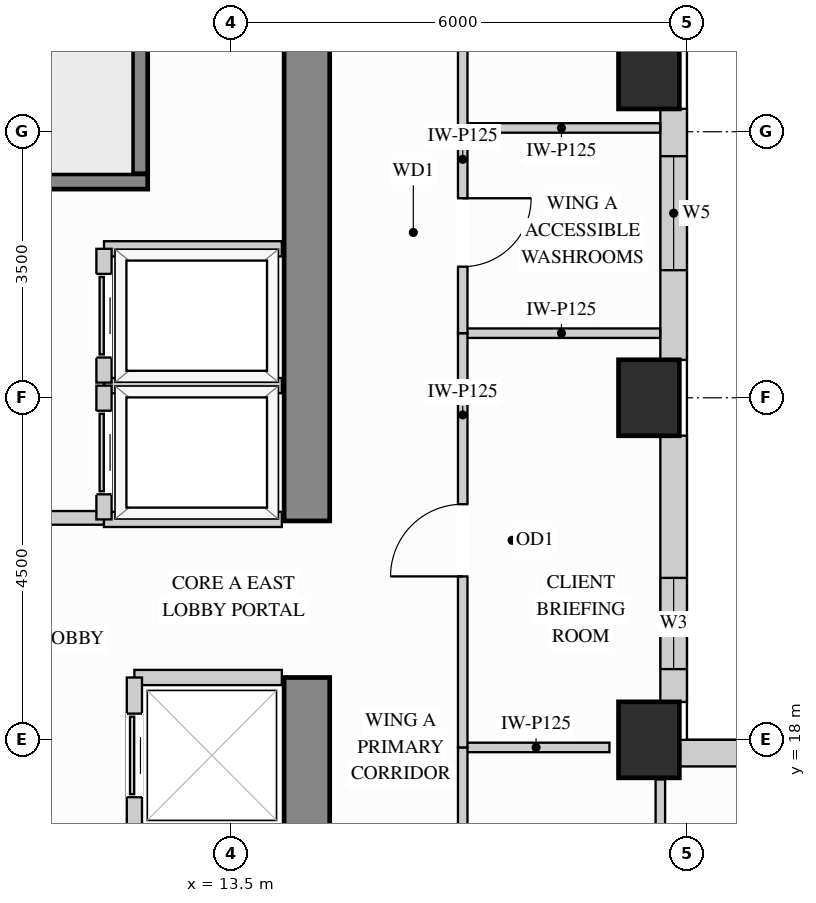
"""IFC4 building model, lengths in metres.
Left out: names, types, materials, properties, quantities, classifications, styles, units other than length and angle.
Written with IfcOpenShell. Run it as: python <this file> out.ifc"""

import sys

from ifc_helpers import new_model, si_unit, direction, frame, frame_2d, origin, origin_2d, place, context, subcontext, project, spatial, rectangle, extrude, source, transform, mapped, element, fill, save


model = new_model("IFC4")
c1 = context("Model", 3, precision=1e-05, world=origin(), true_north=direction((0.0, 1.0)))
c2 = subcontext(c1, "Body", "Model", "MODEL_VIEW")
j1 = project(units=[si_unit("LENGTHUNIT", "METRE"), si_unit("PLANEANGLEUNIT", "RADIAN")], contexts=[c1])
p1 = place(None, origin())
s1 = spatial("IfcSite", under=j1, at=p1, CompositionType="ELEMENT")
p2 = place(p1, origin())
s2 = spatial("IfcBuilding", under=s1, at=p2, CompositionType="ELEMENT")
p3 = place(p2, frame((0.0, 0.0, 146.7)))
s3 = spatial("IfcBuildingStorey", under=s2, at=p3, CompositionType="ELEMENT", Elevation=146.7)
m1 = source(origin(), c2, "Body", "SweptSolid", [
    extrude(rectangle(XDim=0.8, YDim=1.0, at=origin_2d()), origin(), (0.0, 0.0, 1.0), 3.4),
])
for number, where, z_axis, x_axis in (
    (1, (19.0, 18.0, 0.0), (0.0, 0.0, 1.0), (1.0, 0.0, 0.0)),
    (2, (19.0, 22.5, 0.0), (0.0, 0.0, 1.0), (1.0, 0.0, 0.0)),
    (3, (19.0, 26.8, 0.0), (0.0, 0.0, 1.0), (1.0, 0.0, 0.0)),
):
    element("IfcColumn", number, at=place(p3, frame(where, z_axis=z_axis, x_axis=x_axis)), inside=s3, PredefinedType="COLUMN", context=c2, shape_type="MappedRepresentation", body=[
        mapped(m1, transform((0.0, 0.0, 0.0), x_axis=(1.0, 0.0, 0.0), y_axis=(0.0, 1.0, 0.0), z_axis=(0.0, 0.0, 1.0))),
    ])
m2 = source(origin(), c2, "Body", "SweptSolid", [
    extrude(rectangle(XDim=10.02, YDim=0.6, at=frame_2d((5.01, 0.0))), origin(), (0.0, 0.0, 1.0), 3.4),
])
p4 = place(p3, frame((14.5, 8.8, 0.0), z_axis=(0.0, 0.0, 1.0), x_axis=(0.0, 1.0, 0.0)))
e4 = element("IfcWall", 4, at=p4, inside=s3, PredefinedType="SHEAR", context=c2, shape_type="MappedRepresentation", body=[
    mapped(m2, transform((0.0, 0.0, 0.0), x_axis=(1.0, 0.0, 0.0), y_axis=(0.0, 1.0, 0.0), z_axis=(0.0, 0.0, 1.0))),
])
m3 = source(origin(), c2, "Body", "SweptSolid", [
    extrude(rectangle(XDim=8.32, YDim=0.6, at=frame_2d((4.16, 0.0))), origin(), (0.0, 0.0, 1.0), 3.4),
])
p5 = place(p3, frame((14.5, 20.88, 0.0), z_axis=(0.0, 0.0, 1.0), x_axis=(0.0, 1.0, 0.0)))
e5 = element("IfcWall", 5, at=p5, inside=s3, PredefinedType="SHEAR", context=c2, shape_type="MappedRepresentation", body=[
    mapped(m3, transform((0.0, 0.0, 0.0), x_axis=(1.0, 0.0, 0.0), y_axis=(0.0, 1.0, 0.0), z_axis=(0.0, 0.0, 1.0))),
])
p6 = place(p3, frame((34.502, 17.825, 0.0), z_axis=(0.0, 0.0, 1.0), x_axis=(-1.0, 0.0, 0.0)))
e6 = element("IfcWall", 6, at=p6, inside=s3, PredefinedType="SOLIDWALL", context=c2, shape_type="SweptSolid", body=[
    extrude(rectangle(XDim=15.104, YDim=0.35, at=frame_2d((7.552, 0.0))), origin(), (0.0, 0.0, 1.0), 3.385),
])
p7 = place(p6, frame((4.131, 0.0, 0.78)))
e7 = element("IfcOpeningElement", 7, at=p7, cuts=e6, PredefinedType="OPENING", context=c2, shape_type="SweptSolid", body=[
    extrude(rectangle(XDim=1.5, YDim=2.0, at=frame_2d((0.75, 1.0))), frame((0.0, 0.185, 0.0), z_axis=(0.0, -1.0, 0.0), x_axis=(1.0, 0.0, 0.0)), (0.0, 0.0, 1.0), 0.37),
])
p8 = place(p6, frame((9.442, 0.0, 0.78)))
e8 = element("IfcOpeningElement", 8, at=p8, cuts=e6, PredefinedType="OPENING", context=c2, shape_type="SweptSolid", body=[
    extrude(rectangle(XDim=1.5, YDim=2.0, at=frame_2d((0.75, 1.0))), frame((0.0, 0.185, 0.0), z_axis=(0.0, -1.0, 0.0), x_axis=(1.0, 0.0, 0.0)), (0.0, 0.0, 1.0), 0.37),
])
p9 = place(p3, frame((19.325, 18.498, 0.0), z_axis=(0.0, 0.0, 1.0), x_axis=(0.0, 1.0, 0.0)))
e9 = element("IfcWall", 9, at=p9, inside=s3, PredefinedType="SOLIDWALL", context=c2, shape_type="SweptSolid", body=[
    extrude(rectangle(XDim=3.504, YDim=0.35, at=frame_2d((1.752, 0.0))), origin(), (0.0, 0.0, 1.0), 2.612),
])
p10 = place(p9, frame((0.433, 0.0, 0.78)))
e10 = element("IfcOpeningElement", 10, at=p10, cuts=e9, PredefinedType="OPENING", context=c2, shape_type="SweptSolid", body=[
    extrude(rectangle(XDim=1.2, YDim=1.652, at=frame_2d((0.6, 0.826))), frame((0.0, 0.185, 0.0), z_axis=(0.0, -1.0, 0.0), x_axis=(1.0, 0.0, 0.0)), (0.0, 0.0, 1.0), 0.37),
])
p11 = place(p3, frame((19.325, 22.998, 0.0), z_axis=(0.0, 0.0, 1.0), x_axis=(0.0, 1.0, 0.0)))
e11 = element("IfcWall", 11, at=p11, inside=s3, PredefinedType="SOLIDWALL", context=c2, shape_type="SweptSolid", body=[
    extrude(rectangle(XDim=3.304, YDim=0.35, at=frame_2d((1.652, 0.0))), origin(), (0.0, 0.0, 1.0), 2.612),
])
p12 = place(p11, frame((1.18, 0.0, 0.78)))
e12 = element("IfcOpeningElement", 12, at=p12, cuts=e11, PredefinedType="OPENING", context=c2, shape_type="SweptSolid", body=[
    extrude(rectangle(XDim=1.5, YDim=1.652, at=frame_2d((0.75, 0.826))), frame((0.0, 0.185, 0.0), z_axis=(0.0, -1.0, 0.0), x_axis=(1.0, 0.0, 0.0)), (0.0, 0.0, 1.0), 0.37),
])
p13 = place(p3, frame((7.15, 20.92, 0.0), z_axis=(0.0, 0.0, 1.0), x_axis=(1.0, 0.0, 0.0)))
e13 = element("IfcWall", 13, at=p13, inside=s3, PredefinedType="PARTITIONING", context=c2, shape_type="SweptSolid", body=[
    extrude(rectangle(XDim=4.68, YDim=0.18, at=frame_2d((2.34, 0.0))), origin(), (0.0, 0.0, 1.0), 3.385),
])
p14 = place(p13, frame((2.2, 0.0, 0.0)))
e14 = element("IfcOpeningElement", 14, at=p14, cuts=e13, PredefinedType="OPENING", context=c2, shape_type="SweptSolid", body=[
    extrude(rectangle(XDim=1.1, YDim=2.15, at=frame_2d((0.55, 1.075))), frame((0.0, 0.1, 0.0), z_axis=(0.0, -1.0, 0.0), x_axis=(1.0, 0.0, 0.0)), (0.0, 0.0, 1.0), 0.2),
])
m4 = source(origin(), c2, "Body", "SweptSolid", [
    extrude(rectangle(XDim=1.93, YDim=0.125, at=frame_2d((0.965, 0.0))), origin(), (0.0, 0.0, 1.0), 2.773),
])
p15 = place(p3, frame((16.55, 17.9, 0.0), z_axis=(0.0, 0.0, 1.0), x_axis=(1.0, 0.0, 0.0)))
e15 = element("IfcWall", 15, at=p15, inside=s3, PredefinedType="PARTITIONING", context=c2, shape_type="MappedRepresentation", body=[
    mapped(m4, transform((0.0, 0.0, 0.0), x_axis=(1.0, 0.0, 0.0), y_axis=(0.0, 1.0, 0.0), z_axis=(0.0, 0.0, 1.0))),
])
m5 = source(origin(), c2, "Body", "SweptSolid", [
    extrude(rectangle(XDim=2.598, YDim=0.125, at=frame_2d((1.299, 0.0))), origin(), (0.0, 0.0, 1.0), 3.385),
])
for number, where, z_axis, x_axis in (
    (16, (16.55, 23.35, 0.0), (0.0, 0.0, 1.0), (1.0, 0.0, 0.0)),
    (17, (16.55, 26.05, 0.0), (0.0, 0.0, 1.0), (1.0, 0.0, 0.0)),
):
    element("IfcWall", number, at=place(p3, frame(where, z_axis=z_axis, x_axis=x_axis)), inside=s3, PredefinedType="PARTITIONING", context=c2, shape_type="MappedRepresentation", body=[
        mapped(m5, transform((0.0, 0.0, 0.0), x_axis=(1.0, 0.0, 0.0), y_axis=(0.0, 1.0, 0.0), z_axis=(0.0, 0.0, 1.0))),
    ])
m6 = source(origin(), c2, "Body", "SweptSolid", [
    extrude(rectangle(XDim=3.46, YDim=0.125, at=frame_2d((1.73, 0.0))), origin(), (0.0, 0.0, 1.0), 2.773),
])
p16 = place(p3, frame((19.15, 14.02, 0.0), z_axis=(0.0, 0.0, 1.0), x_axis=(0.0, 1.0, 0.0)))
e18 = element("IfcWall", 18, at=p16, inside=s3, PredefinedType="PARTITIONING", context=c2, shape_type="MappedRepresentation", body=[
    mapped(m6, transform((0.0, 0.0, 0.0), x_axis=(1.0, 0.0, 0.0), y_axis=(0.0, 1.0, 0.0), z_axis=(0.0, 0.0, 1.0))),
])
p17 = place(p3, frame((16.55, 12.35, 0.0), z_axis=(0.0, 0.0, 1.0), x_axis=(0.0, 1.0, 0.0)))
e19 = element("IfcWall", 19, at=p17, inside=s3, PredefinedType="PARTITIONING", context=c2, shape_type="SweptSolid", body=[
    extrude(rectangle(XDim=5.55, YDim=0.125, at=frame_2d((2.775, 0.0))), origin(), (0.0, 0.0, 1.0), 3.385),
])
p18 = place(p17, frame((2.3, 0.0, 0.0)))
e20 = element("IfcOpeningElement", 20, at=p18, cuts=e19, PredefinedType="OPENING", context=c2, shape_type="SweptSolid", body=[
    extrude(rectangle(XDim=0.95, YDim=2.15, at=frame_2d((0.475, 1.075))), frame((0.0, 0.073, 0.0), z_axis=(0.0, -1.0, 0.0), x_axis=(1.0, 0.0, 0.0)), (0.0, 0.0, 1.0), 0.145),
])
p19 = place(p3, frame((16.55, 17.9, 0.0), z_axis=(0.0, 0.0, 1.0), x_axis=(0.0, 1.0, 0.0)))
e21 = element("IfcWall", 21, at=p19, inside=s3, PredefinedType="PARTITIONING", context=c2, shape_type="SweptSolid", body=[
    extrude(rectangle(XDim=5.45, YDim=0.125, at=frame_2d((2.725, 0.0))), origin(), (0.0, 0.0, 1.0), 3.385),
])
p20 = place(p19, frame((2.25, 0.0, 0.0)))
e22 = element("IfcOpeningElement", 22, at=p20, cuts=e21, PredefinedType="OPENING", context=c2, shape_type="SweptSolid", body=[
    extrude(rectangle(XDim=0.95, YDim=2.15, at=frame_2d((0.475, 1.075))), frame((0.0, 0.073, 0.0), z_axis=(0.0, -1.0, 0.0), x_axis=(1.0, 0.0, 0.0)), (0.0, 0.0, 1.0), 0.145),
])
p21 = place(p3, frame((16.55, 26.05, 0.0), z_axis=(0.0, 0.0, 1.0), x_axis=(0.0, 1.0, 0.0)))
e23 = element("IfcWall", 23, at=p21, inside=s3, PredefinedType="PARTITIONING", context=c2, shape_type="SweptSolid", body=[
    extrude(rectangle(XDim=6.3, YDim=0.125, at=frame_2d((3.15, 0.0))), origin(), (0.0, 0.0, 1.0), 3.385),
])
p22 = place(p21, frame((2.675, 0.0, 0.0)))
e24 = element("IfcOpeningElement", 24, at=p22, cuts=e23, PredefinedType="OPENING", context=c2, shape_type="SweptSolid", body=[
    extrude(rectangle(XDim=0.95, YDim=2.15, at=frame_2d((0.475, 1.075))), frame((0.0, 0.073, 0.0), z_axis=(0.0, -1.0, 0.0), x_axis=(1.0, 0.0, 0.0)), (0.0, 0.0, 1.0), 0.145),
])
p23 = place(p3, frame((16.55, 23.35, 0.0), z_axis=(0.0, 0.0, 1.0), x_axis=(0.0, 1.0, 0.0)))
e25 = element("IfcWall", 25, at=p23, inside=s3, PredefinedType="PARTITIONING", context=c2, shape_type="SweptSolid", body=[
    extrude(rectangle(XDim=2.7, YDim=0.125, at=frame_2d((1.35, 0.0))), origin(), (0.0, 0.0, 1.0), 3.385),
])
p24 = place(p23, frame((0.875, 0.0, 0.0)))
e26 = element("IfcOpeningElement", 26, at=p24, cuts=e25, PredefinedType="OPENING", context=c2, shape_type="SweptSolid", body=[
    extrude(rectangle(XDim=0.9, YDim=2.15, at=frame_2d((0.45, 1.075))), frame((0.0, 0.073, 0.0), z_axis=(0.0, -1.0, 0.0), x_axis=(1.0, 0.0, 0.0)), (0.0, 0.0, 1.0), 0.145),
])
m7 = source(origin(), c2, "Body", "SweptSolid", [
    extrude(rectangle(XDim=2.34, YDim=0.2, at=frame_2d((1.17, 0.0))), origin(), (0.0, 0.0, 1.0), 3.385),
])
for number, where, z_axis, x_axis in (
    (27, (11.83, 22.66, 0.0), (0.0, 0.0, 1.0), (1.0, 0.0, 0.0)),
    (28, (11.83, 20.9, 0.0), (0.0, 0.0, 1.0), (1.0, 0.0, 0.0)),
):
    element("IfcWall", number, at=place(p3, frame(where, z_axis=z_axis, x_axis=x_axis)), inside=s3, PredefinedType="PARTITIONING", context=c2, shape_type="MappedRepresentation", body=[
        mapped(m7, transform((0.0, 0.0, 0.0), x_axis=(1.0, 0.0, 0.0), y_axis=(0.0, 1.0, 0.0), z_axis=(0.0, 0.0, 1.0))),
    ])
p25 = place(p3, frame((11.83, 20.9, 0.0), z_axis=(0.0, 0.0, 1.0), x_axis=(0.0, 1.0, 0.0)))
e29 = element("IfcWall", 29, at=p25, inside=s3, PredefinedType="PARTITIONING", context=c2, shape_type="SweptSolid", body=[
    extrude(rectangle(XDim=1.76, YDim=0.2, at=frame_2d((0.88, 0.0))), origin(), (0.0, 0.0, 1.0), 3.385),
])
p26 = place(p25, frame((0.33, 0.0, 0.0)))
e30 = element("IfcOpeningElement", 30, at=p26, cuts=e29, PredefinedType="OPENING", context=c2, shape_type="SweptSolid", body=[
    extrude(rectangle(XDim=1.1, YDim=2.2, at=frame_2d((0.55, 1.1))), frame((0.0, 0.11, 0.0), z_axis=(0.0, -1.0, 0.0), x_axis=(1.0, 0.0, 0.0)), (0.0, 0.0, 1.0), 0.22),
])
p27 = place(p3, frame((11.83, 24.46, 0.0), z_axis=(0.0, 0.0, 1.0), x_axis=(1.0, 0.0, 0.0)))
e31 = element("IfcWall", 31, at=p27, inside=s3, PredefinedType="PARTITIONING", context=c2, shape_type="MappedRepresentation", body=[
    mapped(m7, transform((0.0, 0.0, 0.0), x_axis=(1.0, 0.0, 0.0), y_axis=(0.0, 1.0, 0.0), z_axis=(0.0, 0.0, 1.0))),
])
p28 = place(p3, frame((11.83, 22.7, 0.0), z_axis=(0.0, 0.0, 1.0), x_axis=(0.0, 1.0, 0.0)))
e32 = element("IfcWall", 32, at=p28, inside=s3, PredefinedType="PARTITIONING", context=c2, shape_type="SweptSolid", body=[
    extrude(rectangle(XDim=1.76, YDim=0.2, at=frame_2d((0.88, 0.0))), origin(), (0.0, 0.0, 1.0), 3.385),
])
p29 = place(p28, frame((0.33, 0.0, 0.0)))
e33 = element("IfcOpeningElement", 33, at=p29, cuts=e32, PredefinedType="OPENING", context=c2, shape_type="SweptSolid", body=[
    extrude(rectangle(XDim=1.1, YDim=2.2, at=frame_2d((0.55, 1.1))), frame((0.0, 0.11, 0.0), z_axis=(0.0, -1.0, 0.0), x_axis=(1.0, 0.0, 0.0)), (0.0, 0.0, 1.0), 0.22),
])
m8 = source(origin(), c2, "Body", "SweptSolid", [
    extrude(rectangle(XDim=1.94, YDim=0.2, at=frame_2d((0.97, 0.0))), origin(), (0.0, 0.0, 1.0), 3.385),
])
p30 = place(p3, frame((12.23, 18.82, 0.0), z_axis=(0.0, 0.0, 1.0), x_axis=(1.0, 0.0, 0.0)))
e34 = element("IfcWall", 34, at=p30, inside=s3, PredefinedType="PARTITIONING", context=c2, shape_type="MappedRepresentation", body=[
    mapped(m8, transform((0.0, 0.0, 0.0), x_axis=(1.0, 0.0, 0.0), y_axis=(0.0, 1.0, 0.0), z_axis=(0.0, 0.0, 1.0))),
])
p31 = place(p3, frame((12.23, 16.77, 0.0), z_axis=(0.0, 0.0, 1.0), x_axis=(0.0, 1.0, 0.0)))
e35 = element("IfcWall", 35, at=p31, inside=s3, PredefinedType="PARTITIONING", context=c2, shape_type="SweptSolid", body=[
    extrude(rectangle(XDim=2.05, YDim=0.2, at=frame_2d((1.025, 0.0))), origin(), (0.0, 0.0, 1.0), 3.385),
])
p32 = place(p31, frame((0.475, 0.0, 0.0)))
e36 = element("IfcOpeningElement", 36, at=p32, cuts=e35, PredefinedType="OPENING", context=c2, shape_type="SweptSolid", body=[
    extrude(rectangle(XDim=1.1, YDim=2.2, at=frame_2d((0.55, 1.1))), frame((0.0, 0.11, 0.0), z_axis=(0.0, -1.0, 0.0), x_axis=(1.0, 0.0, 0.0)), (0.0, 0.0, 1.0), 0.22),
])
m9 = source(origin(), c2, "Body", "SweptSolid", [
    extrude(rectangle(XDim=3.753, YDim=0.2, at=frame_2d((1.876, 0.0))), origin(), (0.0, 0.0, 1.0), 3.4),
])
p33 = place(p3, frame((12.305, 25.445, 0.0), z_axis=(0.0, 0.0, 1.0), x_axis=(0.0, 1.0, 0.0)))
e37 = element("IfcWall", 37, at=p33, inside=s3, PredefinedType="SHEAR", context=c2, shape_type="MappedRepresentation", body=[
    mapped(m9, transform((0.0, 0.0, 0.0), x_axis=(1.0, 0.0, 0.0), y_axis=(0.0, 1.0, 0.0), z_axis=(0.0, 0.0, 1.0))),
])
p34 = place(p3, frame((4.802, 25.345, 0.0), z_axis=(0.0, 0.0, 1.0), x_axis=(1.0, 0.0, 0.0)))
e38 = element("IfcWall", 38, at=p34, inside=s3, PredefinedType="SHEAR", context=c2, shape_type="SweptSolid", body=[
    extrude(rectangle(XDim=7.603, YDim=0.2, at=frame_2d((3.802, 0.0))), origin(), (0.0, 0.0, 1.0), 3.4),
])
p35 = place(p34, frame((0.4, 0.0, 0.0)))
e39 = element("IfcOpeningElement", 39, at=p35, cuts=e38, PredefinedType="OPENING", context=c2, shape_type="SweptSolid", body=[
    extrude(rectangle(XDim=1.1, YDim=2.15, at=frame_2d((0.55, 1.075))), frame((0.0, 0.11, 0.0), z_axis=(0.0, -1.0, 0.0), x_axis=(1.0, 0.0, 0.0)), (0.0, 0.0, 1.0), 0.22),
])
m10 = source(origin(), c2, "Body", "SweptSolid", [
    extrude(rectangle(XDim=1.1, YDim=2.2, at=frame_2d((0.55, 1.1))), frame((0.0, 0.025, 0.0), z_axis=(0.0, -1.0, 0.0), x_axis=(1.0, 0.0, 0.0)), (0.0, 0.0, 1.0), 0.05),
])
p36 = place(p26, origin())
e40 = element("IfcDoor", 40, at=p36, inside=s3, OperationType="SLIDING_TO_LEFT", PredefinedType="DOOR", context=c2, shape_type="MappedRepresentation", body=[
    mapped(m10, transform((0.0, 0.0, 0.0), x_axis=(1.0, 0.0, 0.0), y_axis=(0.0, 1.0, 0.0), z_axis=(0.0, 0.0, 1.0))),
])
fill(e30, e40)
p37 = place(p29, origin())
e41 = element("IfcDoor", 41, at=p37, inside=s3, OperationType="SLIDING_TO_LEFT", PredefinedType="DOOR", context=c2, shape_type="MappedRepresentation", body=[
    mapped(m10, transform((0.0, 0.0, 0.0), x_axis=(1.0, 0.0, 0.0), y_axis=(0.0, 1.0, 0.0), z_axis=(0.0, 0.0, 1.0))),
])
fill(e33, e41)
p38 = place(p32, origin())
e42 = element("IfcDoor", 42, at=p38, inside=s3, OperationType="SLIDING_TO_LEFT", PredefinedType="DOOR", context=c2, shape_type="MappedRepresentation", body=[
    mapped(m10, transform((0.0, 0.0, 0.0), x_axis=(1.0, 0.0, 0.0), y_axis=(0.0, 1.0, 0.0), z_axis=(0.0, 0.0, 1.0))),
])
fill(e36, e42)
m11 = source(origin(), c2, "Body", "SweptSolid", [
    extrude(rectangle(XDim=0.95, YDim=2.15, at=frame_2d((0.475, 1.075))), frame((0.0, 0.025, 0.0), z_axis=(0.0, -1.0, 0.0), x_axis=(1.0, 0.0, 0.0)), (0.0, 0.0, 1.0), 0.05),
])
p39 = place(p20, origin())
e43 = element("IfcDoor", 43, at=p39, inside=s3, OperationType="SINGLE_SWING_LEFT", PredefinedType="DOOR", context=c2, shape_type="MappedRepresentation", body=[
    mapped(m11, transform((0.0, 0.0, 0.0), x_axis=(1.0, 0.0, 0.0), y_axis=(0.0, 1.0, 0.0), z_axis=(0.0, 0.0, 1.0))),
])
fill(e22, e43)
m12 = source(origin(), c2, "Body", "SweptSolid", [
    extrude(rectangle(XDim=0.9, YDim=2.15, at=frame_2d((0.45, 1.075))), frame((0.0, 0.025, 0.0), z_axis=(0.0, -1.0, 0.0), x_axis=(1.0, 0.0, 0.0)), (0.0, 0.0, 1.0), 0.05),
])
p40 = place(p24, origin())
e44 = element("IfcDoor", 44, at=p40, inside=s3, OperationType="SINGLE_SWING_RIGHT", PredefinedType="DOOR", context=c2, shape_type="MappedRepresentation", body=[
    mapped(m12, transform((0.0, 0.0, 0.0), x_axis=(1.0, 0.0, 0.0), y_axis=(0.0, 1.0, 0.0), z_axis=(0.0, 0.0, 1.0))),
])
fill(e26, e44)
m13 = source(origin(), c2, "Body", "SweptSolid", [
    extrude(rectangle(XDim=1.2, YDim=1.652, at=frame_2d((0.6, 0.826))), frame((0.0, 0.03, 0.0), z_axis=(0.0, -1.0, 0.0), x_axis=(1.0, 0.0, 0.0)), (0.0, 0.0, 1.0), 0.06),
])
p41 = place(p10, origin())
e45 = element("IfcWindow", 45, at=p41, inside=s3, PartitioningType="SINGLE_PANEL", PredefinedType="WINDOW", context=c2, shape_type="MappedRepresentation", body=[
    mapped(m13, transform((0.0, 0.0, 0.0), x_axis=(1.0, 0.0, 0.0), y_axis=(0.0, 1.0, 0.0), z_axis=(0.0, 0.0, 1.0))),
])
fill(e10, e45)
m14 = source(origin(), c2, "Body", "SweptSolid", [
    extrude(rectangle(XDim=1.5, YDim=1.652, at=frame_2d((0.75, 0.826))), frame((0.0, 0.03, 0.0), z_axis=(0.0, -1.0, 0.0), x_axis=(1.0, 0.0, 0.0)), (0.0, 0.0, 1.0), 0.06),
])
p42 = place(p12, origin())
e46 = element("IfcWindow", 46, at=p42, inside=s3, PartitioningType="SINGLE_PANEL", PredefinedType="WINDOW", context=c2, shape_type="MappedRepresentation", body=[
    mapped(m14, transform((0.0, 0.0, 0.0), x_axis=(1.0, 0.0, 0.0), y_axis=(0.0, 1.0, 0.0), z_axis=(0.0, 0.0, 1.0))),
])
fill(e12, e46)
save(model, sys.argv[1])
